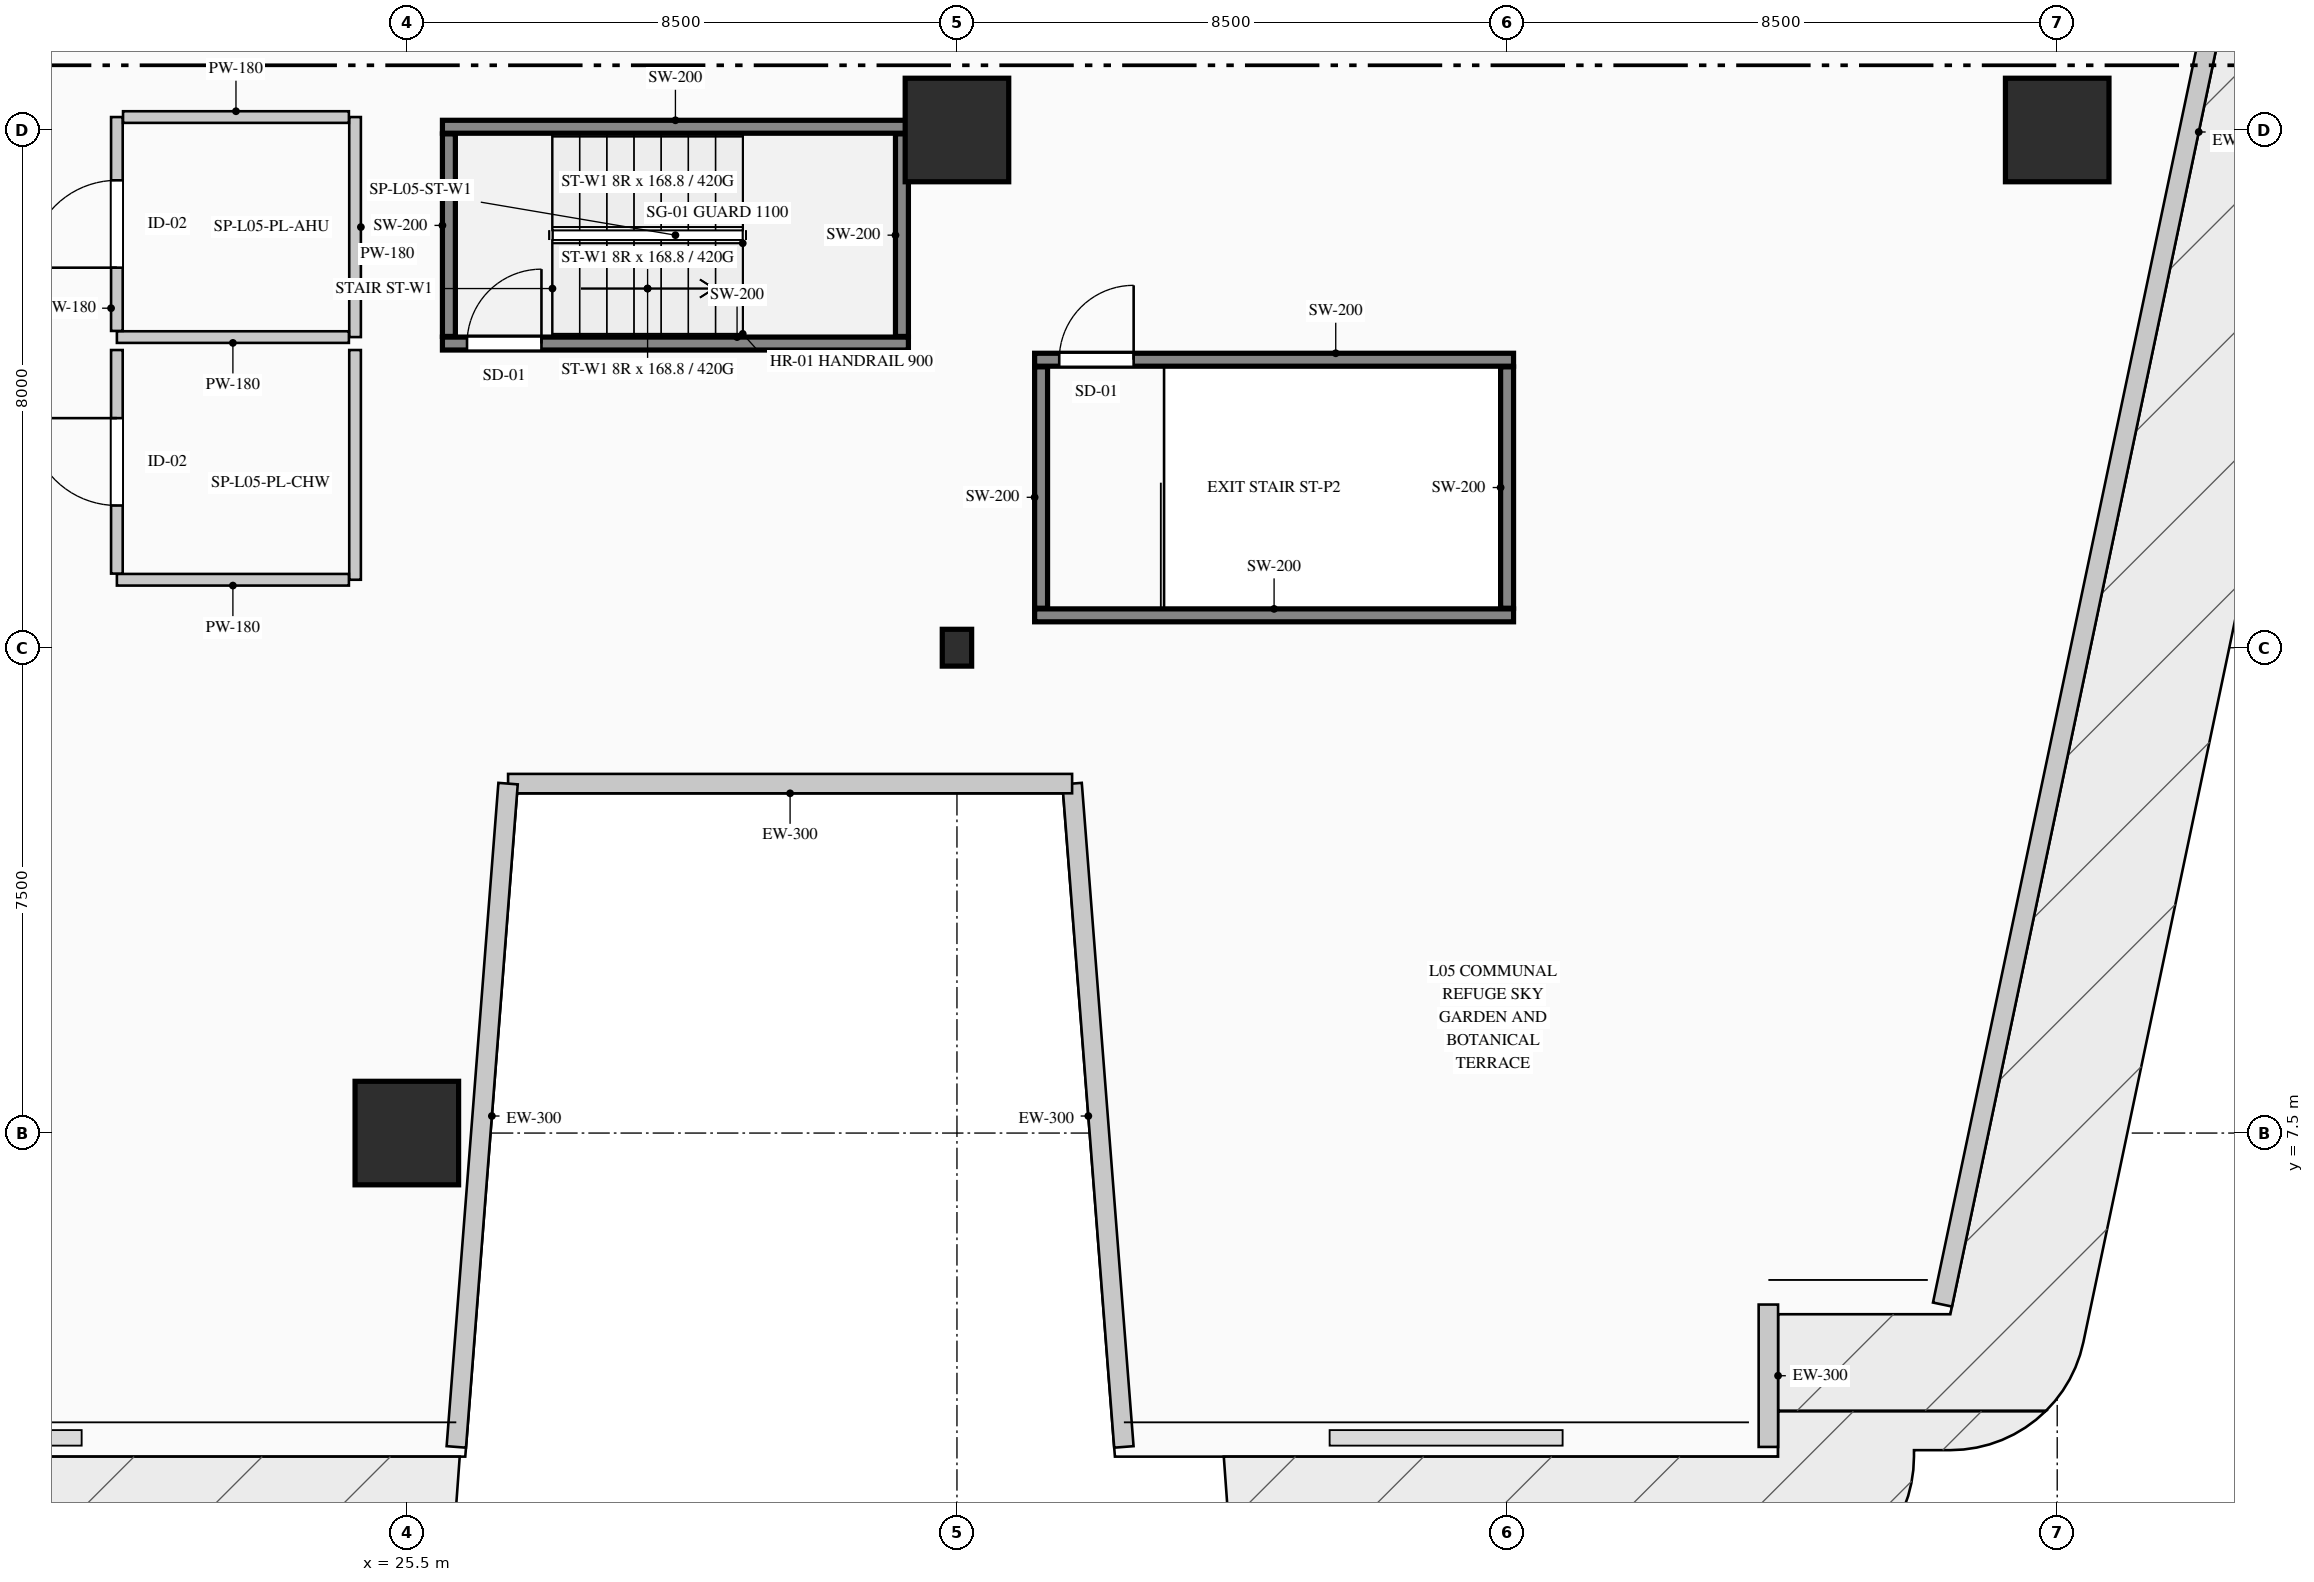
"""IFC4 building model, lengths in metres.
Left out: names, types, materials, properties, quantities, classifications, styles, units other than length and angle.
Written with IfcOpenShell. Run it as: python <this file> out.ifc"""

import sys

from ifc_helpers import new_model, si_unit, direction, frame, frame_2d, origin, origin_2d, place, context, subcontext, project, spatial, rectangle, i_section, extrude, element, fill, save


model = new_model("IFC4")
c1 = context("Model", 3, precision=1e-05, world=origin(), true_north=direction((0.0, 1.0)))
c2 = subcontext(c1, "Body", "Model", "MODEL_VIEW")
j1 = project(units=[si_unit("LENGTHUNIT", "METRE"), si_unit("PLANEANGLEUNIT", "RADIAN")], contexts=[c1])
p1 = place(None, origin())
s1 = spatial("IfcSite", under=j1, at=p1, CompositionType="ELEMENT")
p2 = place(p1, origin())
s2 = spatial("IfcBuilding", under=s1, at=p2, CompositionType="ELEMENT")
p3 = place(p2, frame((0.0, 0.0, 21.6)))
s3 = spatial("IfcBuildingStorey", under=s2, at=p3, CompositionType="ELEMENT", Elevation=21.6)
p4 = place(p3, frame((26.05, 19.7, 0.0), z_axis=(0.0, 0.0, 1.0), x_axis=(1.0, 0.0, 0.0)))
e1 = element("IfcWall", 1, at=p4, inside=s3, PredefinedType="SHEAR", context=c2, shape_type="SweptSolid", body=[
    extrude(rectangle(XDim=7.2, YDim=0.2, at=frame_2d((3.6, 0.0))), origin(), (0.0, 0.0, 1.0), 5.4),
])
p5 = place(p4, frame((0.38, 0.0, 0.0)))
e2 = element("IfcOpeningElement", 2, at=p5, cuts=e1, PredefinedType="OPENING", context=c2, shape_type="SweptSolid", body=[
    extrude(rectangle(XDim=1.15, YDim=2.2, at=frame_2d((0.575, 1.1))), frame((0.0, 0.11, 0.0), z_axis=(0.0, -1.0, 0.0), x_axis=(1.0, 0.0, 0.0)), (0.0, 0.0, 1.0), 0.22),
])
p6 = place(p3, frame((26.05, 23.05, 0.0), z_axis=(0.0, 0.0, 1.0), x_axis=(1.0, 0.0, 0.0)))
e3 = element("IfcWall", 3, at=p6, inside=s3, PredefinedType="SHEAR", context=c2, shape_type="SweptSolid", body=[
    extrude(rectangle(XDim=7.2, YDim=0.2, at=frame_2d((3.6, 0.0))), origin(), (0.0, 0.0, 1.0), 5.4),
])
for number, where, z_axis, x_axis in (
    (4, (26.15, 19.81, 0.0), (0.0, 0.0, 1.0), (0.0, 1.0, 0.0)),
    (5, (33.15, 19.81, 0.0), (0.0, 0.0, 1.0), (0.0, 1.0, 0.0)),
):
    element("IfcWall", number, at=place(p3, frame(where, z_axis=z_axis, x_axis=x_axis)), inside=s3, PredefinedType="SHEAR", context=c2, shape_type="SweptSolid", body=[
        extrude(rectangle(XDim=3.13, YDim=0.2, at=frame_2d((1.565, 0.0))), origin(), (0.0, 0.0, 1.0), 5.4),
    ])
p7 = place(p3, frame((35.2, 15.5, 0.0), z_axis=(0.0, 0.0, 1.0), x_axis=(1.0, 0.0, 0.0)))
e6 = element("IfcWall", 6, at=p7, inside=s3, PredefinedType="SHEAR", context=c2, shape_type="SweptSolid", body=[
    extrude(rectangle(XDim=7.4, YDim=0.2, at=frame_2d((3.7, 0.0))), origin(), (0.0, 0.0, 1.0), 5.4),
])
p8 = place(p3, frame((35.2, 19.45, 0.0), z_axis=(0.0, 0.0, 1.0), x_axis=(1.0, 0.0, 0.0)))
e7 = element("IfcWall", 7, at=p8, inside=s3, PredefinedType="SHEAR", context=c2, shape_type="SweptSolid", body=[
    extrude(rectangle(XDim=7.4, YDim=0.2, at=frame_2d((3.7, 0.0))), origin(), (0.0, 0.0, 1.0), 5.4),
])
p9 = place(p8, frame((0.38, 0.0, 0.0)))
e8 = element("IfcOpeningElement", 8, at=p9, cuts=e7, PredefinedType="OPENING", context=c2, shape_type="SweptSolid", body=[
    extrude(rectangle(XDim=1.15, YDim=2.2, at=frame_2d((0.575, 1.1))), frame((0.0, 0.11, 0.0), z_axis=(0.0, -1.0, 0.0), x_axis=(1.0, 0.0, 0.0)), (0.0, 0.0, 1.0), 0.22),
])
for number, where, z_axis, x_axis in (
    (9, (35.3, 15.61, 0.0), (0.0, 0.0, 1.0), (0.0, 1.0, 0.0)),
    (10, (42.5, 15.61, 0.0), (0.0, 0.0, 1.0), (0.0, 1.0, 0.0)),
):
    element("IfcWall", number, at=place(p3, frame(where, z_axis=z_axis, x_axis=x_axis)), inside=s3, PredefinedType="SHEAR", context=c2, shape_type="SweptSolid", body=[
        extrude(rectangle(XDim=3.73, YDim=0.2, at=frame_2d((1.865, 0.0))), origin(), (0.0, 0.0, 1.0), 5.4),
    ])
p10 = place(p3, frame((25.5, 7.5, 0.0), z_axis=(0.0, 0.0, 1.0), x_axis=(1.0, 0.0, 0.0)))
e11 = element("IfcColumn", 11, at=p10, inside=s3, PredefinedType="COLUMN", context=c2, shape_type="SweptSolid", body=[
    extrude(rectangle(XDim=1.6, YDim=1.6, at=origin_2d()), origin(), (0.0, 0.0, 1.0), 5.4),
])
p11 = place(p3, frame((34.0, 15.0, 0.0), z_axis=(0.0, 0.0, 1.0), x_axis=(1.0, 0.0, 0.0)))
e12 = element("IfcColumn", 12, at=p11, inside=s3, PredefinedType="COLUMN", context=c2, shape_type="SweptSolid", body=[
    extrude(i_section(OverallWidth=0.454, OverallDepth=0.569, WebThickness=0.078, FlangeThickness=0.08, FilletRadius=0.015, at=origin_2d()), origin(), (0.0, 0.0, 1.0), 5.4),
])
for number, where, z_axis, x_axis in (
    (13, (34.0, 23.0, 0.0), (0.0, 0.0, 1.0), (1.0, 0.0, 0.0)),
    (14, (51.0, 23.0, 0.0), (0.0, 0.0, 1.0), (1.0, 0.0, 0.0)),
):
    element("IfcColumn", number, at=place(p3, frame(where, z_axis=z_axis, x_axis=x_axis)), inside=s3, PredefinedType="COLUMN", context=c2, shape_type="SweptSolid", body=[
        extrude(rectangle(XDim=1.6, YDim=1.6, at=origin_2d()), origin(), (0.0, 0.0, 1.0), 5.4),
    ])
p12 = place(p3, frame((56.853, 41.15, 0.0), z_axis=(0.0, 0.0, 1.0), x_axis=(-0.205588847133, -0.978638455168, 0.0)))
e15 = element("IfcWall", 15, at=p12, inside=s3, PredefinedType="STANDARD", context=c2, shape_type="SweptSolid", body=[
    extrude(rectangle(XDim=37.092, YDim=0.3, at=frame_2d((18.546, 0.0))), origin(), (0.0, 0.0, 1.0), 5.0),
])
p13 = place(p3, frame((46.537, 4.85, 0.0), z_axis=(0.0, 0.0, 1.0), x_axis=(0.0, -1.0, 0.0)))
e16 = element("IfcWall", 16, at=p13, inside=s3, PredefinedType="STANDARD", context=c2, shape_type="SweptSolid", body=[
    extrude(rectangle(XDim=2.2, YDim=0.3, at=frame_2d((1.1, 0.0))), origin(), (0.0, 0.0, 1.0), 5.0),
])
p14 = place(p3, frame((36.579, 2.65, 0.0), z_axis=(0.0, 0.0, 1.0), x_axis=(-0.077793257511, 0.996969512616, 0.0)))
e17 = element("IfcWall", 17, at=p14, inside=s3, PredefinedType="STANDARD", context=c2, shape_type="SweptSolid", body=[
    extrude(rectangle(XDim=10.281, YDim=0.3, at=frame_2d((5.141, 0.0))), origin(), (0.0, 0.0, 1.0), 5.0),
])
p15 = place(p3, frame((35.779, 12.9, 0.0), z_axis=(0.0, 0.0, 1.0), x_axis=(-1.0, 0.0, 0.0)))
e18 = element("IfcWall", 18, at=p15, inside=s3, PredefinedType="STANDARD", context=c2, shape_type="SweptSolid", body=[
    extrude(rectangle(XDim=8.715, YDim=0.3, at=frame_2d((4.357, 0.0))), origin(), (0.0, 0.0, 1.0), 5.0),
])
p16 = place(p3, frame((27.064, 12.9, 0.0), z_axis=(0.0, 0.0, 1.0), x_axis=(-0.077793257511, -0.996969512616, 0.0)))
e19 = element("IfcWall", 19, at=p16, inside=s3, PredefinedType="STANDARD", context=c2, shape_type="SweptSolid", body=[
    extrude(rectangle(XDim=10.281, YDim=0.3, at=frame_2d((5.141, 0.0))), origin(), (0.0, 0.0, 1.0), 5.0),
])
p17 = place(p3, frame((24.7, 23.2, 0.0), z_axis=(0.0, 0.0, 1.0), x_axis=(0.0, -1.0, 0.0)))
e20 = element("IfcWall", 20, at=p17, inside=s3, PredefinedType="PARTITIONING", context=c2, shape_type="SweptSolid", body=[
    extrude(rectangle(XDim=3.4, YDim=0.18, at=frame_2d((1.7, 0.0))), origin(), (0.0, 0.0, 1.0), 5.0),
])
p18 = place(p3, frame((24.605, 19.8, 0.0), z_axis=(0.0, 0.0, 1.0), x_axis=(-1.0, 0.0, 0.0)))
e21 = element("IfcWall", 21, at=p18, inside=s3, PredefinedType="PARTITIONING", context=c2, shape_type="SweptSolid", body=[
    extrude(rectangle(XDim=3.585, YDim=0.18, at=frame_2d((1.792, 0.0))), origin(), (0.0, 0.0, 1.0), 5.0),
])
p19 = place(p3, frame((21.02, 19.895, 0.0), z_axis=(0.0, 0.0, 1.0), x_axis=(0.0, 1.0, 0.0)))
e22 = element("IfcWall", 22, at=p19, inside=s3, PredefinedType="PARTITIONING", context=c2, shape_type="SweptSolid", body=[
    extrude(rectangle(XDim=3.305, YDim=0.18, at=frame_2d((1.652, 0.0))), origin(), (0.0, 0.0, 1.0), 5.0),
])
p20 = place(p19, frame((0.978, 0.0, 0.0)))
e23 = element("IfcOpeningElement", 23, at=p20, cuts=e22, PredefinedType="OPENING", context=c2, shape_type="SweptSolid", body=[
    extrude(rectangle(XDim=1.35, YDim=2.2, at=frame_2d((0.675, 1.1))), frame((0.0, 0.1, 0.0), z_axis=(0.0, -1.0, 0.0), x_axis=(1.0, 0.0, 0.0)), (0.0, 0.0, 1.0), 0.2),
])
p21 = place(p3, frame((21.115, 23.2, 0.0), z_axis=(0.0, 0.0, 1.0), x_axis=(1.0, 0.0, 0.0)))
e24 = element("IfcWall", 24, at=p21, inside=s3, PredefinedType="PARTITIONING", context=c2, shape_type="SweptSolid", body=[
    extrude(rectangle(XDim=3.49, YDim=0.18, at=frame_2d((1.745, 0.0))), origin(), (0.0, 0.0, 1.0), 5.0),
])
p22 = place(p3, frame((24.7, 19.6, 0.0), z_axis=(0.0, 0.0, 1.0), x_axis=(0.0, -1.0, 0.0)))
e25 = element("IfcWall", 25, at=p22, inside=s3, PredefinedType="PARTITIONING", context=c2, shape_type="SweptSolid", body=[
    extrude(rectangle(XDim=3.55, YDim=0.18, at=frame_2d((1.775, 0.0))), origin(), (0.0, 0.0, 1.0), 5.0),
])
p23 = place(p3, frame((24.605, 16.05, 0.0), z_axis=(0.0, 0.0, 1.0), x_axis=(-1.0, 0.0, 0.0)))
e26 = element("IfcWall", 26, at=p23, inside=s3, PredefinedType="PARTITIONING", context=c2, shape_type="SweptSolid", body=[
    extrude(rectangle(XDim=3.585, YDim=0.18, at=frame_2d((1.792, 0.0))), origin(), (0.0, 0.0, 1.0), 5.0),
])
p24 = place(p3, frame((21.02, 16.145, 0.0), z_axis=(0.0, 0.0, 1.0), x_axis=(0.0, 1.0, 0.0)))
e27 = element("IfcWall", 27, at=p24, inside=s3, PredefinedType="PARTITIONING", context=c2, shape_type="SweptSolid", body=[
    extrude(rectangle(XDim=3.455, YDim=0.18, at=frame_2d((1.728, 0.0))), origin(), (0.0, 0.0, 1.0), 5.0),
])
p25 = place(p24, frame((1.052, 0.0, 0.0)))
e28 = element("IfcOpeningElement", 28, at=p25, cuts=e27, PredefinedType="OPENING", context=c2, shape_type="SweptSolid", body=[
    extrude(rectangle(XDim=1.35, YDim=2.2, at=frame_2d((0.675, 1.1))), frame((0.0, 0.1, 0.0), z_axis=(0.0, -1.0, 0.0), x_axis=(1.0, 0.0, 0.0)), (0.0, 0.0, 1.0), 0.2),
])
p26 = place(p5, origin())
e29 = element("IfcDoor", 29, at=p26, inside=s3, OperationType="SINGLE_SWING_RIGHT", PredefinedType="DOOR", context=c2, shape_type="SweptSolid", body=[
    extrude(rectangle(XDim=1.15, YDim=2.2, at=frame_2d((0.575, 1.1))), frame((0.0, 0.025, 0.0), z_axis=(0.0, -1.0, 0.0), x_axis=(1.0, 0.0, 0.0)), (0.0, 0.0, 1.0), 0.05),
])
fill(e2, e29)
p27 = place(p9, origin())
e30 = element("IfcDoor", 30, at=p27, inside=s3, OperationType="SINGLE_SWING_RIGHT", PredefinedType="DOOR", context=c2, shape_type="SweptSolid", body=[
    extrude(rectangle(XDim=1.15, YDim=2.2, at=frame_2d((0.575, 1.1))), frame((0.0, 0.025, 0.0), z_axis=(0.0, -1.0, 0.0), x_axis=(1.0, 0.0, 0.0)), (0.0, 0.0, 1.0), 0.05),
])
fill(e8, e30)
p28 = place(p20, origin())
e31 = element("IfcDoor", 31, at=p28, inside=s3, OperationType="SINGLE_SWING_LEFT", PredefinedType="DOOR", context=c2, shape_type="SweptSolid", body=[
    extrude(rectangle(XDim=1.35, YDim=2.2, at=frame_2d((0.675, 1.1))), frame((0.0, 0.025, 0.0), z_axis=(0.0, -1.0, 0.0), x_axis=(1.0, 0.0, 0.0)), (0.0, 0.0, 1.0), 0.05),
])
fill(e23, e31)
p29 = place(p25, origin())
e32 = element("IfcDoor", 32, at=p29, inside=s3, OperationType="SINGLE_SWING_RIGHT", PredefinedType="DOOR", context=c2, shape_type="SweptSolid", body=[
    extrude(rectangle(XDim=1.35, YDim=2.2, at=frame_2d((0.675, 1.1))), frame((0.0, 0.025, 0.0), z_axis=(0.0, -1.0, 0.0), x_axis=(1.0, 0.0, 0.0)), (0.0, 0.0, 1.0), 0.05),
])
fill(e28, e32)
save(model, sys.argv[1])
